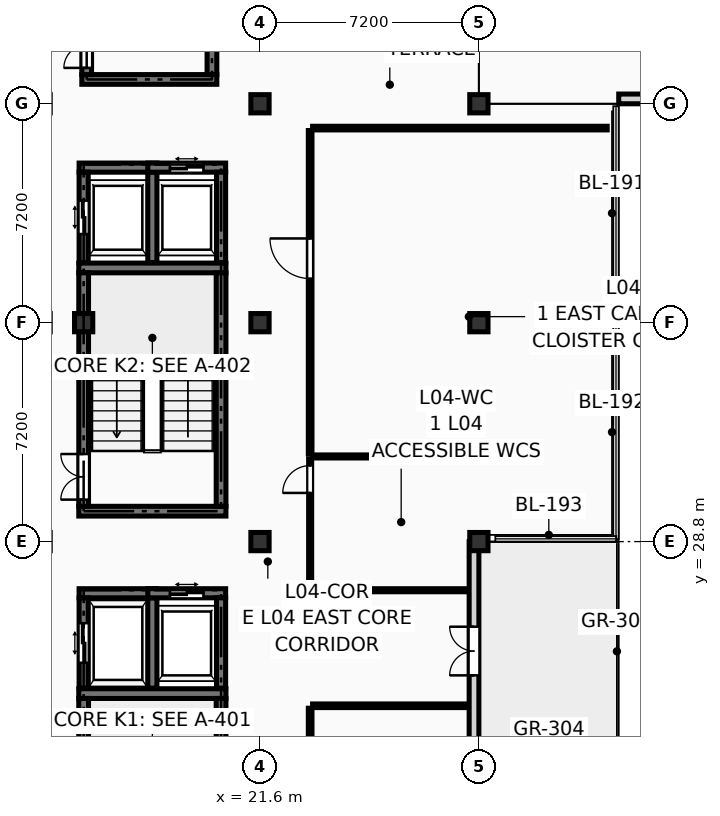
"""IFC4 building model, lengths in metres.
Left out: names, types, materials, properties, quantities, classifications, styles, units other than length and angle.
Written with IfcOpenShell. Run it as: python <this file> out.ifc"""

import sys

from ifc_helpers import new_model, si_unit, direction, frame, frame_2d, origin, origin_2d, place, context, subcontext, project, spatial, rectangle, extrude, element, fill, save


model = new_model("IFC4")
c1 = context("Model", 3, precision=1e-05, world=origin(), true_north=direction((0.0, 1.0)))
c2 = subcontext(c1, "Body", "Model", "MODEL_VIEW")
j1 = project(units=[si_unit("LENGTHUNIT", "METRE"), si_unit("PLANEANGLEUNIT", "RADIAN")], contexts=[c1])
p1 = place(None, origin())
s1 = spatial("IfcSite", under=j1, at=p1, CompositionType="ELEMENT")
p2 = place(p1, origin())
s2 = spatial("IfcBuilding", under=s1, at=p2, CompositionType="ELEMENT")
p3 = place(p2, frame((0.0, 0.0, 15.75)))
s3 = spatial("IfcBuildingStorey", under=s2, at=p3, CompositionType="ELEMENT", Elevation=15.75)
for number, where, z_axis, x_axis in (
    (1, (15.8, 36.0, 0.0), (0.0, 0.0, 1.0), (1.0, 0.0, 0.0)),
    (2, (21.6, 28.8, 0.0), (0.0, 0.0, 1.0), (1.0, 0.0, 0.0)),
    (3, (21.6, 36.0, 0.0), (0.0, 0.0, 1.0), (1.0, 0.0, 0.0)),
    (4, (21.6, 43.2, 0.0), (0.0, 0.0, 1.0), (1.0, 0.0, 0.0)),
    (5, (28.8, 28.8, 0.0), (0.0, 0.0, 1.0), (1.0, 0.0, 0.0)),
    (6, (28.8, 36.0, 0.0), (0.0, 0.0, 1.0), (1.0, 0.0, 0.0)),
    (7, (28.8, 43.2, 0.0), (0.0, 0.0, 1.0), (1.0, 0.0, 0.0)),
):
    element("IfcColumn", number, at=place(p3, frame(where, z_axis=z_axis, x_axis=x_axis)), inside=s3, PredefinedType="COLUMN", context=c2, shape_type="SweptSolid", body=[
        extrude(rectangle(XDim=0.6, YDim=0.6, at=origin_2d()), origin(), (0.0, 0.0, 1.0), 3.6),
    ])
p4 = place(p3, frame((33.4, 43.36, 0.0), z_axis=(0.0, 0.0, 1.0), x_axis=(1.0, 0.0, 0.0)))
e8 = element("IfcWall", 8, at=p4, inside=s3, PredefinedType="SOLIDWALL", context=c2, shape_type="SweptSolid", body=[
    extrude(rectangle(XDim=2.6, YDim=0.32, at=frame_2d((1.3, 0.0))), origin(), (0.0, 0.0, 1.0), 3.38),
])
p5 = place(p3, frame((28.64, 21.6, 0.0), z_axis=(0.0, 0.0, 1.0), x_axis=(0.0, 1.0, 0.0)))
e9 = element("IfcWall", 9, at=p5, inside=s3, PredefinedType="SOLIDWALL", context=c2, shape_type="SweptSolid", body=[
    extrude(rectangle(XDim=7.2, YDim=0.32, at=frame_2d((3.6, 0.0))), origin(), (0.0, 0.0, 1.0), 2.84),
])
p6 = place(p5, frame((2.8, 0.0, 0.0)))
e10 = element("IfcOpeningElement", 10, at=p6, cuts=e9, PredefinedType="OPENING", context=c2, shape_type="SweptSolid", body=[
    extrude(rectangle(XDim=1.6, YDim=2.25, at=frame_2d((0.8, 1.125))), frame((0.0, 0.172, 0.0), z_axis=(0.0, -1.0, 0.0), x_axis=(1.0, 0.0, 0.0)), (0.0, 0.0, 1.0), 0.344),
])
p7 = place(p3, frame((15.64, 23.8, 0.0), z_axis=(0.0, 0.0, 1.0), x_axis=(1.0, 0.0, 0.0)))
e11 = element("IfcWall", 11, at=p7, inside=s3, PredefinedType="SHEAR", context=c2, shape_type="SweptSolid", body=[
    extrude(rectangle(XDim=4.84, YDim=0.32, at=frame_2d((2.42, 0.0))), origin(), (0.0, 0.0, 1.0), 3.39),
])
p8 = place(p3, frame((15.8, 15.96, 0.0), z_axis=(0.0, 0.0, 1.0), x_axis=(0.0, 1.0, 0.0)))
e12 = element("IfcWall", 12, at=p8, inside=s3, PredefinedType="SHEAR", context=c2, shape_type="SweptSolid", body=[
    extrude(rectangle(XDim=7.68, YDim=0.32, at=frame_2d((3.84, 0.0))), origin(), (0.0, 0.0, 1.0), 3.39),
])
p9 = place(p8, frame((0.22, 0.0, 0.0)))
e13 = element("IfcOpeningElement", 13, at=p9, cuts=e12, PredefinedType="OPENING", context=c2, shape_type="SweptSolid", body=[
    extrude(rectangle(XDim=1.5, YDim=2.2, at=frame_2d((0.75, 1.1))), frame((0.0, 0.172, 0.0), z_axis=(0.0, -1.0, 0.0), x_axis=(1.0, 0.0, 0.0)), (0.0, 0.0, 1.0), 0.344),
])
p10 = place(p3, frame((20.32, 15.96, 0.0), z_axis=(0.0, 0.0, 1.0), x_axis=(0.0, 1.0, 0.0)))
e14 = element("IfcWall", 14, at=p10, inside=s3, PredefinedType="SHEAR", context=c2, shape_type="SweptSolid", body=[
    extrude(rectangle(XDim=7.68, YDim=0.32, at=frame_2d((3.84, 0.0))), origin(), (0.0, 0.0, 1.0), 3.39),
])
for number, where, z_axis, x_axis in (
    (15, (15.64, 29.8, 0.0), (0.0, 0.0, 1.0), (1.0, 0.0, 0.0)),
    (16, (15.64, 37.8, 0.0), (0.0, 0.0, 1.0), (1.0, 0.0, 0.0)),
):
    element("IfcWall", number, at=place(p3, frame(where, z_axis=z_axis, x_axis=x_axis)), inside=s3, PredefinedType="SHEAR", context=c2, shape_type="SweptSolid", body=[
        extrude(rectangle(XDim=4.84, YDim=0.32, at=frame_2d((2.42, 0.0))), origin(), (0.0, 0.0, 1.0), 3.39),
    ])
p11 = place(p3, frame((15.8, 29.96, 0.0), z_axis=(0.0, 0.0, 1.0), x_axis=(0.0, 1.0, 0.0)))
e17 = element("IfcWall", 17, at=p11, inside=s3, PredefinedType="SHEAR", context=c2, shape_type="SweptSolid", body=[
    extrude(rectangle(XDim=7.68, YDim=0.32, at=frame_2d((3.84, 0.0))), origin(), (0.0, 0.0, 1.0), 3.39),
])
p12 = place(p11, frame((0.22, 0.0, 0.0)))
e18 = element("IfcOpeningElement", 18, at=p12, cuts=e17, PredefinedType="OPENING", context=c2, shape_type="SweptSolid", body=[
    extrude(rectangle(XDim=1.5, YDim=2.2, at=frame_2d((0.75, 1.1))), frame((0.0, 0.172, 0.0), z_axis=(0.0, -1.0, 0.0), x_axis=(1.0, 0.0, 0.0)), (0.0, 0.0, 1.0), 0.344),
])
p13 = place(p3, frame((20.32, 29.96, 0.0), z_axis=(0.0, 0.0, 1.0), x_axis=(0.0, 1.0, 0.0)))
e19 = element("IfcWall", 19, at=p13, inside=s3, PredefinedType="SHEAR", context=c2, shape_type="SweptSolid", body=[
    extrude(rectangle(XDim=7.68, YDim=0.32, at=frame_2d((3.84, 0.0))), origin(), (0.0, 0.0, 1.0), 3.39),
])
p14 = place(p3, frame((15.74, 44.0, 0.0), z_axis=(0.0, 0.0, 1.0), x_axis=(1.0, 0.0, 0.0)))
e20 = element("IfcWall", 20, at=p14, inside=s3, PredefinedType="SHEAR", context=c2, shape_type="SweptSolid", body=[
    extrude(rectangle(XDim=4.44, YDim=0.32, at=frame_2d((2.22, 0.0))), origin(), (0.0, 0.0, 1.0), 3.39),
])
p15 = place(p3, frame((15.9, 44.16, 0.0), z_axis=(0.0, 0.0, 1.0), x_axis=(0.0, 1.0, 0.0)))
e21 = element("IfcWall", 21, at=p15, inside=s3, PredefinedType="SHEAR", context=c2, shape_type="SweptSolid", body=[
    extrude(rectangle(XDim=7.28, YDim=0.32, at=frame_2d((3.64, 0.0))), origin(), (0.0, 0.0, 1.0), 3.39),
])
p16 = place(p15, frame((0.22, 0.0, 0.0)))
e22 = element("IfcOpeningElement", 22, at=p16, cuts=e21, PredefinedType="OPENING", context=c2, shape_type="SweptSolid", body=[
    extrude(rectangle(XDim=1.5, YDim=2.2, at=frame_2d((0.75, 1.1))), frame((0.0, 0.172, 0.0), z_axis=(0.0, -1.0, 0.0), x_axis=(1.0, 0.0, 0.0)), (0.0, 0.0, 1.0), 0.344),
])
p17 = place(p3, frame((20.02, 44.16, 0.0), z_axis=(0.0, 0.0, 1.0), x_axis=(0.0, 1.0, 0.0)))
e23 = element("IfcWall", 23, at=p17, inside=s3, PredefinedType="SHEAR", context=c2, shape_type="SweptSolid", body=[
    extrude(rectangle(XDim=7.28, YDim=0.32, at=frame_2d((3.64, 0.0))), origin(), (0.0, 0.0, 1.0), 3.39),
])
p18 = place(p3, frame((15.65, 27.1, 0.0), z_axis=(0.0, 0.0, 1.0), x_axis=(1.0, 0.0, 0.0)))
e24 = element("IfcWall", 24, at=p18, inside=s3, PredefinedType="SHEAR", context=c2, shape_type="SweptSolid", body=[
    extrude(rectangle(XDim=2.56, YDim=0.3, at=frame_2d((1.28, 0.0))), origin(), (0.0, 0.0, 1.0), 3.39),
])
p19 = place(p3, frame((15.8, 23.98, 0.0), z_axis=(0.0, 0.0, 1.0), x_axis=(0.0, 1.0, 0.0)))
e25 = element("IfcWall", 25, at=p19, inside=s3, PredefinedType="SHEAR", context=c2, shape_type="SweptSolid", body=[
    extrude(rectangle(XDim=2.97, YDim=0.3, at=frame_2d((1.485, 0.0))), origin(), (0.0, 0.0, 1.0), 3.39),
])
p20 = place(p19, frame((0.835, 0.0, 0.0)))
e26 = element("IfcOpeningElement", 26, at=p20, cuts=e25, PredefinedType="OPENING", context=c2, shape_type="SweptSolid", body=[
    extrude(rectangle(XDim=1.3, YDim=2.25, at=frame_2d((0.65, 1.125))), frame((0.0, 0.162, 0.0), z_axis=(0.0, -1.0, 0.0), x_axis=(1.0, 0.0, 0.0)), (0.0, 0.0, 1.0), 0.324),
])
p21 = place(p3, frame((18.06, 23.98, 0.0), z_axis=(0.0, 0.0, 1.0), x_axis=(0.0, 1.0, 0.0)))
e27 = element("IfcWall", 27, at=p21, inside=s3, PredefinedType="SHEAR", context=c2, shape_type="SweptSolid", body=[
    extrude(rectangle(XDim=2.97, YDim=0.3, at=frame_2d((1.485, 0.0))), origin(), (0.0, 0.0, 1.0), 3.39),
])
p22 = place(p3, frame((17.91, 27.1, 0.0), z_axis=(0.0, 0.0, 1.0), x_axis=(1.0, 0.0, 0.0)))
e28 = element("IfcWall", 28, at=p22, inside=s3, PredefinedType="SHEAR", context=c2, shape_type="SweptSolid", body=[
    extrude(rectangle(XDim=2.56, YDim=0.3, at=frame_2d((1.28, 0.0))), origin(), (0.0, 0.0, 1.0), 3.39),
])
p23 = place(p22, frame((0.73, 0.0, 0.0)))
e29 = element("IfcOpeningElement", 29, at=p23, cuts=e28, PredefinedType="OPENING", context=c2, shape_type="SweptSolid", body=[
    extrude(rectangle(XDim=1.1, YDim=2.2, at=frame_2d((0.55, 1.1))), frame((0.0, 0.162, 0.0), z_axis=(0.0, -1.0, 0.0), x_axis=(1.0, 0.0, 0.0)), (0.0, 0.0, 1.0), 0.324),
])
p24 = place(p3, frame((20.32, 23.98, 0.0), z_axis=(0.0, 0.0, 1.0), x_axis=(0.0, 1.0, 0.0)))
e30 = element("IfcWall", 30, at=p24, inside=s3, PredefinedType="SHEAR", context=c2, shape_type="SweptSolid", body=[
    extrude(rectangle(XDim=2.97, YDim=0.3, at=frame_2d((1.485, 0.0))), origin(), (0.0, 0.0, 1.0), 3.39),
])
p25 = place(p3, frame((15.65, 41.1, 0.0), z_axis=(0.0, 0.0, 1.0), x_axis=(1.0, 0.0, 0.0)))
e31 = element("IfcWall", 31, at=p25, inside=s3, PredefinedType="SHEAR", context=c2, shape_type="SweptSolid", body=[
    extrude(rectangle(XDim=2.56, YDim=0.3, at=frame_2d((1.28, 0.0))), origin(), (0.0, 0.0, 1.0), 3.39),
])
p26 = place(p3, frame((15.8, 37.98, 0.0), z_axis=(0.0, 0.0, 1.0), x_axis=(0.0, 1.0, 0.0)))
e32 = element("IfcWall", 32, at=p26, inside=s3, PredefinedType="SHEAR", context=c2, shape_type="SweptSolid", body=[
    extrude(rectangle(XDim=2.97, YDim=0.3, at=frame_2d((1.485, 0.0))), origin(), (0.0, 0.0, 1.0), 3.39),
])
p27 = place(p26, frame((0.935, 0.0, 0.0)))
e33 = element("IfcOpeningElement", 33, at=p27, cuts=e32, PredefinedType="OPENING", context=c2, shape_type="SweptSolid", body=[
    extrude(rectangle(XDim=1.1, YDim=2.2, at=frame_2d((0.55, 1.1))), frame((0.0, 0.162, 0.0), z_axis=(0.0, -1.0, 0.0), x_axis=(1.0, 0.0, 0.0)), (0.0, 0.0, 1.0), 0.324),
])
p28 = place(p3, frame((18.06, 37.98, 0.0), z_axis=(0.0, 0.0, 1.0), x_axis=(0.0, 1.0, 0.0)))
e34 = element("IfcWall", 34, at=p28, inside=s3, PredefinedType="SHEAR", context=c2, shape_type="SweptSolid", body=[
    extrude(rectangle(XDim=2.97, YDim=0.3, at=frame_2d((1.485, 0.0))), origin(), (0.0, 0.0, 1.0), 3.39),
])
p29 = place(p3, frame((17.91, 41.1, 0.0), z_axis=(0.0, 0.0, 1.0), x_axis=(1.0, 0.0, 0.0)))
e35 = element("IfcWall", 35, at=p29, inside=s3, PredefinedType="SHEAR", context=c2, shape_type="SweptSolid", body=[
    extrude(rectangle(XDim=2.56, YDim=0.3, at=frame_2d((1.28, 0.0))), origin(), (0.0, 0.0, 1.0), 3.39),
])
p30 = place(p29, frame((0.73, 0.0, 0.0)))
e36 = element("IfcOpeningElement", 36, at=p30, cuts=e35, PredefinedType="OPENING", context=c2, shape_type="SweptSolid", body=[
    extrude(rectangle(XDim=1.1, YDim=2.2, at=frame_2d((0.55, 1.1))), frame((0.0, 0.162, 0.0), z_axis=(0.0, -1.0, 0.0), x_axis=(1.0, 0.0, 0.0)), (0.0, 0.0, 1.0), 0.324),
])
p31 = place(p3, frame((20.32, 37.98, 0.0), z_axis=(0.0, 0.0, 1.0), x_axis=(0.0, 1.0, 0.0)))
e37 = element("IfcWall", 37, at=p31, inside=s3, PredefinedType="SHEAR", context=c2, shape_type="SweptSolid", body=[
    extrude(rectangle(XDim=2.97, YDim=0.3, at=frame_2d((1.485, 0.0))), origin(), (0.0, 0.0, 1.0), 3.39),
])
p32 = place(p3, frame((23.25, 14.73, 0.0), z_axis=(0.0, 0.0, 1.0), x_axis=(0.0, 1.0, 0.0)))
e38 = element("IfcWall", 38, at=p32, inside=s3, PredefinedType="PARTITIONING", context=c2, shape_type="SweptSolid", body=[
    extrude(rectangle(XDim=8.59, YDim=0.12, at=frame_2d((4.295, 0.0))), origin(), (0.0, 0.0, 1.0), 3.375),
])
p33 = place(p32, frame((3.445, 0.0, 0.0)))
e39 = element("IfcOpeningElement", 39, at=p33, cuts=e38, PredefinedType="OPENING", context=c2, shape_type="SweptSolid", body=[
    extrude(rectangle(XDim=1.7, YDim=2.28, at=frame_2d((0.85, 1.14))), frame((0.0, 0.072, 0.0), z_axis=(0.0, -1.0, 0.0), x_axis=(1.0, 0.0, 0.0)), (0.0, 0.0, 1.0), 0.144),
])
p34 = place(p3, frame((23.33, 23.4, 0.0), z_axis=(0.0, 0.0, 1.0), x_axis=(1.0, 0.0, 0.0)))
e40 = element("IfcWall", 40, at=p34, inside=s3, PredefinedType="PARTITIONING", context=c2, shape_type="SweptSolid", body=[
    extrude(rectangle(XDim=5.09, YDim=0.12, at=frame_2d((2.545, 0.0))), origin(), (0.0, 0.0, 1.0), 3.375),
])
p35 = place(p3, frame((23.25, 27.28, 0.0), z_axis=(0.0, 0.0, 1.0), x_axis=(0.0, 1.0, 0.0)))
e41 = element("IfcWall", 41, at=p35, inside=s3, PredefinedType="PARTITIONING", context=c2, shape_type="SweptSolid", body=[
    extrude(rectangle(XDim=4.24, YDim=0.1, at=frame_2d((2.12, 0.0))), origin(), (0.0, 0.0, 1.0), 3.375),
])
p36 = place(p35, frame((3.12, 0.0, 0.0)))
e42 = element("IfcOpeningElement", 42, at=p36, cuts=e41, PredefinedType="OPENING", context=c2, shape_type="SweptSolid", body=[
    extrude(rectangle(XDim=0.9, YDim=2.1, at=frame_2d((0.45, 1.05))), frame((0.0, 0.062, 0.0), z_axis=(0.0, -1.0, 0.0), x_axis=(1.0, 0.0, 0.0)), (0.0, 0.0, 1.0), 0.124),
])
for number, where, z_axis, x_axis in (
    (43, (23.33, 27.2, 0.0), (0.0, 0.0, 1.0), (1.0, 0.0, 0.0)),
    (44, (23.33, 31.6, 0.0), (0.0, 0.0, 1.0), (1.0, 0.0, 0.0)),
):
    element("IfcWall", number, at=place(p3, frame(where, z_axis=z_axis, x_axis=x_axis)), inside=s3, PredefinedType="PARTITIONING", context=c2, shape_type="SweptSolid", body=[
        extrude(rectangle(XDim=5.09, YDim=0.1, at=frame_2d((2.545, 0.0))), origin(), (0.0, 0.0, 1.0), 3.375),
    ])
p37 = place(p3, frame((23.25, 31.68, 0.0), z_axis=(0.0, 0.0, 1.0), x_axis=(0.0, 1.0, 0.0)))
e45 = element("IfcWall", 45, at=p37, inside=s3, PredefinedType="PARTITIONING", context=c2, shape_type="SweptSolid", body=[
    extrude(rectangle(XDim=10.64, YDim=0.12, at=frame_2d((5.32, 0.0))), origin(), (0.0, 0.0, 1.0), 3.375),
])
p38 = place(p37, frame((5.77, 0.0, 0.0)))
e46 = element("IfcOpeningElement", 46, at=p38, cuts=e45, PredefinedType="OPENING", context=c2, shape_type="SweptSolid", body=[
    extrude(rectangle(XDim=1.32, YDim=2.2, at=frame_2d((0.66, 1.1))), frame((0.0, 0.072, 0.0), z_axis=(0.0, -1.0, 0.0), x_axis=(1.0, 0.0, 0.0)), (0.0, 0.0, 1.0), 0.144),
])
p39 = place(p3, frame((23.33, 42.4, 0.0), z_axis=(0.0, 0.0, 1.0), x_axis=(1.0, 0.0, 0.0)))
e47 = element("IfcWall", 47, at=p39, inside=s3, PredefinedType="PARTITIONING", context=c2, shape_type="SweptSolid", body=[
    extrude(rectangle(XDim=9.69, YDim=0.12, at=frame_2d((4.845, 0.0))), origin(), (0.0, 0.0, 1.0), 3.375),
])
p40 = place(p6, origin())
e48 = element("IfcDoor", 48, at=p40, inside=s3, OperationType="DOUBLE_DOOR_SINGLE_SWING", PredefinedType="DOOR", context=c2, shape_type="SweptSolid", body=[
    extrude(rectangle(XDim=1.6, YDim=2.25, at=frame_2d((0.8, 1.125))), frame((0.0, 0.025, 0.0), z_axis=(0.0, -1.0, 0.0), x_axis=(1.0, 0.0, 0.0)), (0.0, 0.0, 1.0), 0.05),
])
fill(e10, e48)
p41 = place(p12, origin())
e49 = element("IfcDoor", 49, at=p41, inside=s3, OperationType="DOUBLE_DOOR_SINGLE_SWING", PredefinedType="DOOR", context=c2, shape_type="SweptSolid", body=[
    extrude(rectangle(XDim=1.5, YDim=2.2, at=frame_2d((0.75, 1.1))), frame((0.0, 0.025, 0.0), z_axis=(0.0, -1.0, 0.0), x_axis=(1.0, 0.0, 0.0)), (0.0, 0.0, 1.0), 0.05),
])
fill(e18, e49)
p42 = place(p16, origin())
e50 = element("IfcDoor", 50, at=p42, inside=s3, OperationType="DOUBLE_DOOR_SINGLE_SWING", PredefinedType="DOOR", context=c2, shape_type="SweptSolid", body=[
    extrude(rectangle(XDim=1.5, YDim=2.2, at=frame_2d((0.75, 1.1))), frame((0.0, 0.025, 0.0), z_axis=(0.0, -1.0, 0.0), x_axis=(1.0, 0.0, 0.0)), (0.0, 0.0, 1.0), 0.05),
])
fill(e22, e50)
p43 = place(p20, origin())
e51 = element("IfcDoor", 51, at=p43, inside=s3, OperationType="DOUBLE_DOOR_SLIDING", PredefinedType="DOOR", context=c2, shape_type="SweptSolid", body=[
    extrude(rectangle(XDim=1.3, YDim=2.25, at=frame_2d((0.65, 1.125))), frame((0.0, 0.025, 0.0), z_axis=(0.0, -1.0, 0.0), x_axis=(1.0, 0.0, 0.0)), (0.0, 0.0, 1.0), 0.05),
])
fill(e26, e51)
p44 = place(p23, origin())
e52 = element("IfcDoor", 52, at=p44, inside=s3, OperationType="DOUBLE_DOOR_SLIDING", PredefinedType="DOOR", context=c2, shape_type="SweptSolid", body=[
    extrude(rectangle(XDim=1.1, YDim=2.2, at=frame_2d((0.55, 1.1))), frame((0.0, 0.025, 0.0), z_axis=(0.0, -1.0, 0.0), x_axis=(1.0, 0.0, 0.0)), (0.0, 0.0, 1.0), 0.05),
])
fill(e29, e52)
p45 = place(p27, origin())
e53 = element("IfcDoor", 53, at=p45, inside=s3, OperationType="DOUBLE_DOOR_SLIDING", PredefinedType="DOOR", context=c2, shape_type="SweptSolid", body=[
    extrude(rectangle(XDim=1.1, YDim=2.2, at=frame_2d((0.55, 1.1))), frame((0.0, 0.025, 0.0), z_axis=(0.0, -1.0, 0.0), x_axis=(1.0, 0.0, 0.0)), (0.0, 0.0, 1.0), 0.05),
])
fill(e33, e53)
p46 = place(p30, origin())
e54 = element("IfcDoor", 54, at=p46, inside=s3, OperationType="DOUBLE_DOOR_SLIDING", PredefinedType="DOOR", context=c2, shape_type="SweptSolid", body=[
    extrude(rectangle(XDim=1.1, YDim=2.2, at=frame_2d((0.55, 1.1))), frame((0.0, 0.025, 0.0), z_axis=(0.0, -1.0, 0.0), x_axis=(1.0, 0.0, 0.0)), (0.0, 0.0, 1.0), 0.05),
])
fill(e36, e54)
p47 = place(p36, origin())
e55 = element("IfcDoor", 55, at=p47, inside=s3, OperationType="SINGLE_SWING_LEFT", PredefinedType="DOOR", context=c2, shape_type="SweptSolid", body=[
    extrude(rectangle(XDim=0.9, YDim=2.1, at=frame_2d((0.45, 1.05))), frame((0.0, 0.025, 0.0), z_axis=(0.0, -1.0, 0.0), x_axis=(1.0, 0.0, 0.0)), (0.0, 0.0, 1.0), 0.05),
])
fill(e42, e55)
p48 = place(p38, origin())
e56 = element("IfcDoor", 56, at=p48, inside=s3, OperationType="SINGLE_SWING_RIGHT", PredefinedType="DOOR", context=c2, shape_type="SweptSolid", body=[
    extrude(rectangle(XDim=1.32, YDim=2.2, at=frame_2d((0.66, 1.1))), frame((0.0, 0.025, 0.0), z_axis=(0.0, -1.0, 0.0), x_axis=(1.0, 0.0, 0.0)), (0.0, 0.0, 1.0), 0.05),
])
fill(e46, e56)
save(model, sys.argv[1])
